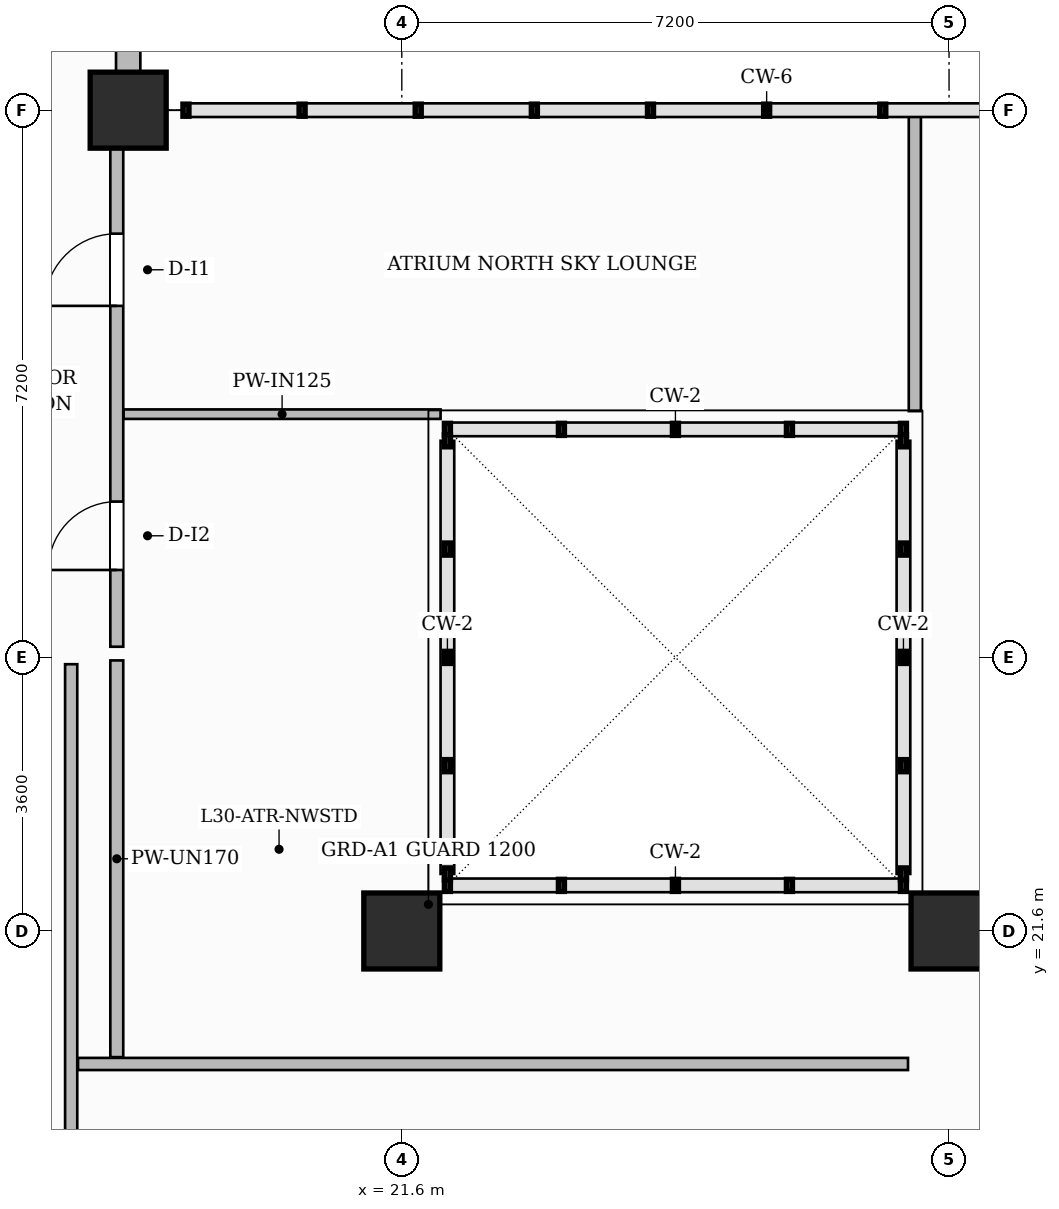
"""IFC4 building model, lengths in metres.
Left out: names, types, materials, properties, quantities, classifications, styles, units other than length and angle.
Written with IfcOpenShell. Run it as: python <this file> out.ifc"""

import sys

from ifc_helpers import new_model, si_unit, direction, frame, frame_2d, origin, origin_2d, place, context, subcontext, project, spatial, rectangle, extrude, source, transform, mapped, element, fill, save


model = new_model("IFC4")
c1 = context("Model", 3, precision=1e-05, world=origin(), true_north=direction((0.0, 1.0)))
c2 = subcontext(c1, "Body", "Model", "MODEL_VIEW")
j1 = project(units=[si_unit("LENGTHUNIT", "METRE"), si_unit("PLANEANGLEUNIT", "RADIAN")], contexts=[c1])
p1 = place(None, origin())
s1 = spatial("IfcSite", under=j1, at=p1, CompositionType="ELEMENT")
p2 = place(p1, origin())
s2 = spatial("IfcBuilding", under=s1, at=p2, CompositionType="ELEMENT")
p3 = place(p2, frame((0.0, 0.0, 122.9)))
s3 = spatial("IfcBuildingStorey", under=s2, at=p3, CompositionType="ELEMENT", Elevation=122.9)
m1 = source(origin(), c2, "Body", "SweptSolid", [
    extrude(rectangle(XDim=1.0, YDim=1.0, at=origin_2d()), origin(), (0.0, 0.0, 1.0), 3.7),
])
for number, where, z_axis, x_axis in (
    (1, (21.6, 21.6, 0.0), (0.0, 0.0, 1.0), (1.0, 0.0, 0.0)),
    (2, (28.8, 21.6, 0.0), (0.0, 0.0, 1.0), (1.0, 0.0, 0.0)),
    (3, (18.0, 32.4, 0.0), (0.0, 0.0, 1.0), (1.0, 0.0, 0.0)),
):
    element("IfcColumn", number, at=place(p3, frame(where, z_axis=z_axis, x_axis=x_axis)), inside=s3, PredefinedType="COLUMN", context=c2, shape_type="MappedRepresentation", body=[
        mapped(m1, transform((0.0, 0.0, 0.0), scale=1.0)),
    ])
p4 = place(p3, frame((17.25, 12.36, 0.0), z_axis=(0.0, 0.0, 1.0), x_axis=(0.0, 1.0, 0.0)))
e4 = element("IfcWall", 4, at=p4, inside=s3, PredefinedType="PARTITIONING", context=c2, shape_type="SweptSolid", body=[
    extrude(rectangle(XDim=12.75, YDim=0.16, at=frame_2d((6.375, 0.0))), origin(), (0.0, 0.0, 1.0), 3.45),
])
p5 = place(p3, frame((17.85, 19.94, 0.0), z_axis=(0.0, 0.0, 1.0), x_axis=(0.0, 1.0, 0.0)))
e5 = element("IfcWall", 5, at=p5, inside=s3, PredefinedType="PARTITIONING", context=c2, shape_type="SweptSolid", body=[
    extrude(rectangle(XDim=5.22, YDim=0.17, at=frame_2d((2.61, 0.0))), origin(), (0.0, 0.0, 1.0), 3.105),
])
p6 = place(p3, frame((17.85, 25.34, 0.0), z_axis=(0.0, 0.0, 1.0), x_axis=(0.0, 1.0, 0.0)))
e6 = element("IfcWall", 6, at=p6, inside=s3, PredefinedType="PARTITIONING", context=c2, shape_type="SweptSolid", body=[
    extrude(rectangle(XDim=6.87, YDim=0.17, at=frame_2d((3.435, 0.0))), origin(), (0.0, 0.0, 1.0), 3.45),
])
p7 = place(p6, frame((1.01, 0.0, 0.0)))
e7 = element("IfcOpeningElement", 7, at=p7, cuts=e6, PredefinedType="OPENING", context=c2, shape_type="SweptSolid", body=[
    extrude(rectangle(XDim=0.9, YDim=2.15, at=frame_2d((0.45, 1.075))), frame((0.0, 0.095, 0.0), z_axis=(0.0, -1.0, 0.0), x_axis=(1.0, 0.0, 0.0)), (0.0, 0.0, 1.0), 0.19),
])
p8 = place(p6, frame((4.485, 0.0, 0.0)))
e8 = element("IfcOpeningElement", 8, at=p8, cuts=e6, PredefinedType="OPENING", context=c2, shape_type="SweptSolid", body=[
    extrude(rectangle(XDim=0.95, YDim=2.15, at=frame_2d((0.475, 1.075))), frame((0.0, 0.095, 0.0), z_axis=(0.0, -1.0, 0.0), x_axis=(1.0, 0.0, 0.0)), (0.0, 0.0, 1.0), 0.19),
])
p9 = place(p3, frame((28.35, 28.44, 0.0), z_axis=(0.0, 0.0, 1.0), x_axis=(0.0, 1.0, 0.0)))
e9 = element("IfcWall", 9, at=p9, inside=s3, PredefinedType="PARTITIONING", context=c2, shape_type="SweptSolid", body=[
    extrude(rectangle(XDim=3.932, YDim=0.16, at=frame_2d((1.966, 0.0))), origin(), (0.0, 0.0, 1.0), 3.45),
])
p10 = place(p3, frame((17.94, 28.4, 0.0), z_axis=(0.0, 0.0, 1.0), x_axis=(1.0, 0.0, 0.0)))
e10 = element("IfcWall", 10, at=p10, inside=s3, PredefinedType="PARTITIONING", context=c2, shape_type="SweptSolid", body=[
    extrude(rectangle(XDim=4.17, YDim=0.125, at=frame_2d((2.085, 0.0))), origin(), (0.0, 0.0, 1.0), 3.45),
])
p11 = place(p3, frame((17.34, 19.85, 0.0), z_axis=(0.0, 0.0, 1.0), x_axis=(1.0, 0.0, 0.0)))
e11 = element("IfcWall", 11, at=p11, inside=s3, PredefinedType="PARTITIONING", context=c2, shape_type="SweptSolid", body=[
    extrude(rectangle(XDim=10.92, YDim=0.16, at=frame_2d((5.46, 0.0))), origin(), (0.0, 0.0, 1.0), 3.45),
])
p12 = place(p3, frame((18.0, 32.4, 0.0), z_axis=(0.0, 0.0, 1.0), x_axis=(0.0, 1.0, 0.0)))
e12 = element("IfcWall", 12, at=p12, inside=s3, PredefinedType="SOLIDWALL", context=c2, shape_type="SweptSolid", body=[
    extrude(rectangle(XDim=14.35, YDim=0.32, at=frame_2d((7.175, 0.0))), origin(), (0.0, 0.0, 1.0), 3.45),
])
p13 = place(p12, frame((0.85, 0.0, 0.0)))
e13 = element("IfcOpeningElement", 13, at=p13, cuts=e12, PredefinedType="OPENING", context=c2, shape_type="SweptSolid", body=[
    extrude(rectangle(XDim=1.2, YDim=2.2, at=frame_2d((0.6, 1.1))), frame((0.0, 0.17, 0.0), z_axis=(0.0, -1.0, 0.0), x_axis=(1.0, 0.0, 0.0)), (0.0, 0.0, 1.0), 0.34),
])
p14 = place(p12, frame((3.475, 0.0, 0.8)))
e14 = element("IfcOpeningElement", 14, at=p14, cuts=e12, PredefinedType="OPENING", context=c2, shape_type="SweptSolid", body=[
    extrude(rectangle(XDim=1.8, YDim=1.85, at=frame_2d((0.9, 0.925))), frame((0.0, 0.17, 0.0), z_axis=(0.0, -1.0, 0.0), x_axis=(1.0, 0.0, 0.0)), (0.0, 0.0, 1.0), 0.34),
])
p15 = place(p12, frame((8.525, 0.0, 0.8)))
e15 = element("IfcOpeningElement", 15, at=p15, cuts=e12, PredefinedType="OPENING", context=c2, shape_type="SweptSolid", body=[
    extrude(rectangle(XDim=1.8, YDim=1.85, at=frame_2d((0.9, 0.925))), frame((0.0, 0.17, 0.0), z_axis=(0.0, -1.0, 0.0), x_axis=(1.0, 0.0, 0.0)), (0.0, 0.0, 1.0), 0.34),
])
p16 = place(p12, frame((11.275, 0.0, 0.8)))
e16 = element("IfcOpeningElement", 16, at=p16, cuts=e12, PredefinedType="OPENING", context=c2, shape_type="SweptSolid", body=[
    extrude(rectangle(XDim=1.8, YDim=1.85, at=frame_2d((0.9, 0.925))), frame((0.0, 0.17, 0.0), z_axis=(0.0, -1.0, 0.0), x_axis=(1.0, 0.0, 0.0)), (0.0, 0.0, 1.0), 0.34),
])
m2 = source(origin(), c2, "Body", "SweptSolid", [
    extrude(rectangle(XDim=0.9, YDim=2.15, at=frame_2d((0.45, 1.075))), frame((0.0, 0.025, 0.0), z_axis=(0.0, -1.0, 0.0), x_axis=(1.0, 0.0, 0.0)), (0.0, 0.0, 1.0), 0.05),
])
p17 = place(p7, origin())
e17 = element("IfcDoor", 17, at=p17, inside=s3, OperationType="SINGLE_SWING_LEFT", PredefinedType="DOOR", context=c2, shape_type="MappedRepresentation", body=[
    mapped(m2, transform((0.0, 0.0, 0.0), scale=1.0)),
])
fill(e7, e17)
m3 = source(origin(), c2, "Body", "SweptSolid", [
    extrude(rectangle(XDim=0.95, YDim=2.15, at=frame_2d((0.475, 1.075))), frame((0.0, 0.025, 0.0), z_axis=(0.0, -1.0, 0.0), x_axis=(1.0, 0.0, 0.0)), (0.0, 0.0, 1.0), 0.05),
])
p18 = place(p8, origin())
e18 = element("IfcDoor", 18, at=p18, inside=s3, OperationType="SINGLE_SWING_LEFT", PredefinedType="DOOR", context=c2, shape_type="MappedRepresentation", body=[
    mapped(m3, transform((0.0, 0.0, 0.0), scale=1.0)),
])
fill(e8, e18)
save(model, sys.argv[1])
